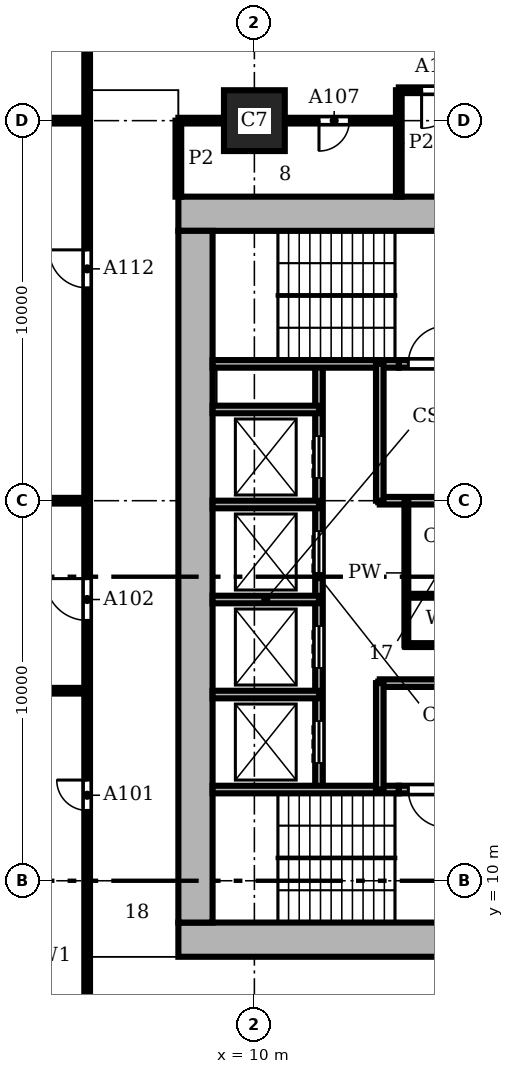
"""IFC4 building model, lengths in metres.
Left out: names, types, materials, properties, quantities, classifications, styles, units other than length and angle.
Written with IfcOpenShell. Run it as: python <this file> out.ifc"""

import sys

from ifc_helpers import new_model, si_unit, direction, frame, frame_2d, origin, origin_2d, place, context, subcontext, project, spatial, rectangle, extrude, element, fill, save


model = new_model("IFC4")
c1 = context("Model", 3, precision=1e-05, world=origin(), true_north=direction((0.0, 1.0)))
c2 = subcontext(c1, "Body", "Model", "MODEL_VIEW")
j1 = project(units=[si_unit("LENGTHUNIT", "METRE"), si_unit("PLANEANGLEUNIT", "RADIAN")], contexts=[c1])
p1 = place(None, origin())
s1 = spatial("IfcSite", under=j1, at=p1, CompositionType="ELEMENT")
p2 = place(p1, origin())
s2 = spatial("IfcBuilding", under=s1, at=p2, CompositionType="ELEMENT")
p3 = place(p2, frame((0.0, 0.0, 12.0)))
s3 = spatial("IfcBuildingStorey", under=s2, at=p3, CompositionType="ELEMENT", Elevation=12.0)
p4 = place(p3, frame((10.0, 30.0, 0.0), z_axis=(0.0, 0.0, 1.0), x_axis=(1.0, 0.0, 0.0)))
e1 = element("IfcColumn", 1, at=p4, inside=s3, PredefinedType="COLUMN", context=c2, shape_type="SweptSolid", body=[
    extrude(rectangle(XDim=1.6, YDim=1.6, at=origin_2d()), origin(), (0.0, 0.0, 1.0), 3.9),
])
for number, where, z_axis, x_axis in (
    (2, (8.0, 8.45, 0.0), (0.0, 0.0, 1.0), (1.0, 0.0, 0.0)),
    (3, (28.0, 27.55, 0.0), (0.0, 0.0, 1.0), (-1.0, 0.0, 0.0)),
):
    element("IfcWall", number, at=place(p3, frame(where, z_axis=z_axis, x_axis=x_axis)), inside=s3, PredefinedType="SHEAR", context=c2, shape_type="SweptSolid", body=[
        extrude(rectangle(XDim=20.0, YDim=0.9, at=frame_2d((10.0, 0.0))), origin(), (0.0, 0.0, 1.0), 3.9),
    ])
p5 = place(p3, frame((8.45, 27.1, 0.0), z_axis=(0.0, 0.0, 1.0), x_axis=(0.0, -1.0, 0.0)))
e4 = element("IfcWall", 4, at=p5, inside=s3, PredefinedType="SHEAR", context=c2, shape_type="SweptSolid", body=[
    extrude(rectangle(XDim=18.2, YDim=0.9, at=frame_2d((9.1, 0.0))), origin(), (0.0, 0.0, 1.0), 3.9),
])
p6 = place(p3, frame((2.532, 8.878, 0.0), z_axis=(0.0, 0.0, 1.0), x_axis=(0.608759824817, -0.793354571229, 0.0)))
e5 = element("IfcWall", 5, at=p6, inside=s3, PredefinedType="SOLIDWALL", context=c2, shape_type="SweptSolid", body=[
    extrude(rectangle(XDim=4.121, YDim=0.4, at=frame_2d((2.061, 0.0))), origin(), (0.0, 0.0, 1.0), 3.9),
])
p7 = place(p6, frame((1.611, 0.0, 0.9)))
e6 = element("IfcOpeningElement", 6, at=p7, cuts=e5, PredefinedType="OPENING", context=c2, shape_type="SweptSolid", body=[
    extrude(rectangle(XDim=0.9, YDim=2.35, at=frame_2d((0.45, 1.175))), frame((0.0, 0.21, 0.0), z_axis=(0.0, -1.0, 0.0), x_axis=(1.0, 0.0, 0.0)), (0.0, 0.0, 1.0), 0.42),
])
p8 = place(p3, frame((8.9, 12.4, 0.0), z_axis=(0.0, 0.0, 1.0), x_axis=(1.0, 0.0, 0.0)))
e7 = element("IfcWall", 7, at=p8, inside=s3, PredefinedType="SHEAR", context=c2, shape_type="SweptSolid", body=[
    extrude(rectangle(XDim=4.9, YDim=0.2, at=frame_2d((2.45, 0.0))), origin(), (0.0, 0.0, 1.0), 3.58),
])
p9 = place(p3, frame((13.8, 12.4, 0.0), z_axis=(0.0, 0.0, 1.0), x_axis=(1.0, 0.0, 0.0)))
e8 = element("IfcWall", 8, at=p9, inside=s3, PredefinedType="SHEAR", context=c2, shape_type="SweptSolid", body=[
    extrude(rectangle(XDim=13.3, YDim=0.2, at=frame_2d((6.65, 0.0))), origin(), (0.0, 0.0, 1.0), 3.58),
])
p10 = place(p9, frame((2.4, 0.0, 0.0)))
e9 = element("IfcOpeningElement", 9, at=p10, cuts=e8, PredefinedType="OPENING", context=c2, shape_type="SweptSolid", body=[
    extrude(rectangle(XDim=1.1, YDim=2.1, at=frame_2d((0.55, 1.05))), frame((0.0, 0.11, 0.0), z_axis=(0.0, -1.0, 0.0), x_axis=(1.0, 0.0, 0.0)), (0.0, 0.0, 1.0), 0.22),
])
p11 = place(p9, frame((4.9, 0.0, 0.0)))
e10 = element("IfcOpeningElement", 10, at=p11, cuts=e8, PredefinedType="OPENING", context=c2, shape_type="SweptSolid", body=[
    extrude(rectangle(XDim=1.1, YDim=2.1, at=frame_2d((0.55, 1.05))), frame((0.0, 0.11, 0.0), z_axis=(0.0, -1.0, 0.0), x_axis=(1.0, 0.0, 0.0)), (0.0, 0.0, 1.0), 0.22),
])
p12 = place(p9, frame((0.25, 0.0, 0.0)))
e11 = element("IfcOpeningElement", 11, at=p12, cuts=e8, PredefinedType="OPENING", context=c2, shape_type="SweptSolid", body=[
    extrude(rectangle(XDim=1.0, YDim=2.1, at=frame_2d((0.5, 1.05))), frame((0.0, 0.11, 0.0), z_axis=(0.0, -1.0, 0.0), x_axis=(1.0, 0.0, 0.0)), (0.0, 0.0, 1.0), 0.22),
])
p13 = place(p3, frame((8.9, 14.9, 0.0), z_axis=(0.0, 0.0, 1.0), x_axis=(1.0, 0.0, 0.0)))
e12 = element("IfcWall", 12, at=p13, inside=s3, PredefinedType="SHEAR", context=c2, shape_type="SweptSolid", body=[
    extrude(rectangle(XDim=2.8, YDim=0.2, at=frame_2d((1.4, 0.0))), origin(), (0.0, 0.0, 1.0), 3.58),
])
p14 = place(p3, frame((13.3, 15.2, 0.0), z_axis=(0.0, 0.0, 1.0), x_axis=(1.0, 0.0, 0.0)))
e13 = element("IfcWall", 13, at=p14, inside=s3, PredefinedType="SHEAR", context=c2, shape_type="SweptSolid", body=[
    extrude(rectangle(XDim=9.7, YDim=0.2, at=frame_2d((4.85, 0.0))), origin(), (0.0, 0.0, 1.0), 3.58),
])
p15 = place(p3, frame((14.0, 16.2, 0.0), z_axis=(0.0, 0.0, 1.0), x_axis=(1.0, 0.0, 0.0)))
e14 = element("IfcWall", 14, at=p15, inside=s3, PredefinedType="PARTITIONING", context=c2, shape_type="SweptSolid", body=[
    extrude(rectangle(XDim=8.0, YDim=0.1, at=frame_2d((4.0, 0.0))), origin(), (0.0, 0.0, 1.0), 3.58),
])
p16 = place(p3, frame((8.9, 17.4, 0.0), z_axis=(0.0, 0.0, 1.0), x_axis=(1.0, 0.0, 0.0)))
e15 = element("IfcWall", 15, at=p16, inside=s3, PredefinedType="SHEAR", context=c2, shape_type="SweptSolid", body=[
    extrude(rectangle(XDim=2.8, YDim=0.2, at=frame_2d((1.4, 0.0))), origin(), (0.0, 0.0, 1.0), 3.58),
])
p17 = place(p3, frame((14.0, 17.5, 0.0), z_axis=(0.0, 0.0, 1.0), x_axis=(1.0, 0.0, 0.0)))
e16 = element("IfcWall", 16, at=p17, inside=s3, PredefinedType="PARTITIONING", context=c2, shape_type="SweptSolid", body=[
    extrude(rectangle(XDim=8.0, YDim=0.1, at=frame_2d((4.0, 0.0))), origin(), (0.0, 0.0, 1.0), 3.58),
])
p18 = place(p17, frame((0.85, 0.0, 0.0)))
e17 = element("IfcOpeningElement", 17, at=p18, cuts=e16, PredefinedType="OPENING", context=c2, shape_type="SweptSolid", body=[
    extrude(rectangle(XDim=0.9, YDim=2.1, at=frame_2d((0.45, 1.05))), frame((0.0, 0.06, 0.0), z_axis=(0.0, -1.0, 0.0), x_axis=(1.0, 0.0, 0.0)), (0.0, 0.0, 1.0), 0.12),
])
p19 = place(p17, frame((3.55, 0.0, 0.0)))
e18 = element("IfcOpeningElement", 18, at=p19, cuts=e16, PredefinedType="OPENING", context=c2, shape_type="SweptSolid", body=[
    extrude(rectangle(XDim=0.9, YDim=2.1, at=frame_2d((0.45, 1.05))), frame((0.0, 0.06, 0.0), z_axis=(0.0, -1.0, 0.0), x_axis=(1.0, 0.0, 0.0)), (0.0, 0.0, 1.0), 0.12),
])
p20 = place(p17, frame((5.8, 0.0, 0.0)))
e19 = element("IfcOpeningElement", 19, at=p20, cuts=e16, PredefinedType="OPENING", context=c2, shape_type="SweptSolid", body=[
    extrude(rectangle(XDim=0.9, YDim=2.1, at=frame_2d((0.45, 1.05))), frame((0.0, 0.06, 0.0), z_axis=(0.0, -1.0, 0.0), x_axis=(1.0, 0.0, 0.0)), (0.0, 0.0, 1.0), 0.12),
])
p21 = place(p17, frame((7.2, 0.0, 0.0)))
e20 = element("IfcOpeningElement", 20, at=p21, cuts=e16, PredefinedType="OPENING", context=c2, shape_type="SweptSolid", body=[
    extrude(rectangle(XDim=0.7, YDim=2.1, at=frame_2d((0.35, 1.05))), frame((0.0, 0.06, 0.0), z_axis=(0.0, -1.0, 0.0), x_axis=(1.0, 0.0, 0.0)), (0.0, 0.0, 1.0), 0.12),
])
p22 = place(p3, frame((8.9, 19.9, 0.0), z_axis=(0.0, 0.0, 1.0), x_axis=(1.0, 0.0, 0.0)))
e21 = element("IfcWall", 21, at=p22, inside=s3, PredefinedType="SHEAR", context=c2, shape_type="SweptSolid", body=[
    extrude(rectangle(XDim=2.8, YDim=0.2, at=frame_2d((1.4, 0.0))), origin(), (0.0, 0.0, 1.0), 3.58),
])
p23 = place(p3, frame((13.3, 20.0, 0.0), z_axis=(0.0, 0.0, 1.0), x_axis=(1.0, 0.0, 0.0)))
e22 = element("IfcWall", 22, at=p23, inside=s3, PredefinedType="SHEAR", context=c2, shape_type="SweptSolid", body=[
    extrude(rectangle(XDim=4.7, YDim=0.2, at=frame_2d((2.35, 0.0))), origin(), (0.0, 0.0, 1.0), 3.58),
])
p24 = place(p3, frame((8.9, 22.4, 0.0), z_axis=(0.0, 0.0, 1.0), x_axis=(1.0, 0.0, 0.0)))
e23 = element("IfcWall", 23, at=p24, inside=s3, PredefinedType="SHEAR", context=c2, shape_type="SweptSolid", body=[
    extrude(rectangle(XDim=2.8, YDim=0.2, at=frame_2d((1.4, 0.0))), origin(), (0.0, 0.0, 1.0), 3.58),
])
p25 = place(p3, frame((8.9, 23.6, 0.0), z_axis=(0.0, 0.0, 1.0), x_axis=(1.0, 0.0, 0.0)))
e24 = element("IfcWall", 24, at=p25, inside=s3, PredefinedType="SHEAR", context=c2, shape_type="SweptSolid", body=[
    extrude(rectangle(XDim=4.9, YDim=0.2, at=frame_2d((2.45, 0.0))), origin(), (0.0, 0.0, 1.0), 3.58),
])
p26 = place(p3, frame((13.8, 23.6, 0.0), z_axis=(0.0, 0.0, 1.0), x_axis=(1.0, 0.0, 0.0)))
e25 = element("IfcWall", 25, at=p26, inside=s3, PredefinedType="SHEAR", context=c2, shape_type="SweptSolid", body=[
    extrude(rectangle(XDim=13.3, YDim=0.2, at=frame_2d((6.65, 0.0))), origin(), (0.0, 0.0, 1.0), 3.58),
])
p27 = place(p26, frame((2.4, 0.0, 0.0)))
e26 = element("IfcOpeningElement", 26, at=p27, cuts=e25, PredefinedType="OPENING", context=c2, shape_type="SweptSolid", body=[
    extrude(rectangle(XDim=1.1, YDim=2.1, at=frame_2d((0.55, 1.05))), frame((0.0, 0.11, 0.0), z_axis=(0.0, -1.0, 0.0), x_axis=(1.0, 0.0, 0.0)), (0.0, 0.0, 1.0), 0.22),
])
p28 = place(p26, frame((4.9, 0.0, 0.0)))
e27 = element("IfcOpeningElement", 27, at=p28, cuts=e25, PredefinedType="OPENING", context=c2, shape_type="SweptSolid", body=[
    extrude(rectangle(XDim=1.1, YDim=2.1, at=frame_2d((0.55, 1.05))), frame((0.0, 0.11, 0.0), z_axis=(0.0, -1.0, 0.0), x_axis=(1.0, 0.0, 0.0)), (0.0, 0.0, 1.0), 0.22),
])
p29 = place(p26, frame((0.25, 0.0, 0.0)))
e28 = element("IfcOpeningElement", 28, at=p29, cuts=e25, PredefinedType="OPENING", context=c2, shape_type="SweptSolid", body=[
    extrude(rectangle(XDim=1.0, YDim=2.1, at=frame_2d((0.5, 1.05))), frame((0.0, 0.11, 0.0), z_axis=(0.0, -1.0, 0.0), x_axis=(1.0, 0.0, 0.0)), (0.0, 0.0, 1.0), 0.22),
])
p30 = place(p3, frame((11.7, 12.4, 0.0), z_axis=(0.0, 0.0, 1.0), x_axis=(0.0, 1.0, 0.0)))
e29 = element("IfcWall", 29, at=p30, inside=s3, PredefinedType="SHEAR", context=c2, shape_type="SweptSolid", body=[
    extrude(rectangle(XDim=11.2, YDim=0.2, at=frame_2d((5.6, 0.0))), origin(), (0.0, 0.0, 1.0), 3.58),
])
p31 = place(p30, frame((0.7, 0.0, 0.0)))
e30 = element("IfcOpeningElement", 30, at=p31, cuts=e29, PredefinedType="OPENING", context=c2, shape_type="SweptSolid", body=[
    extrude(rectangle(XDim=1.1, YDim=2.1, at=frame_2d((0.55, 1.05))), frame((0.0, 0.11, 0.0), z_axis=(0.0, -1.0, 0.0), x_axis=(1.0, 0.0, 0.0)), (0.0, 0.0, 1.0), 0.22),
])
p32 = place(p30, frame((3.2, 0.0, 0.0)))
e31 = element("IfcOpeningElement", 31, at=p32, cuts=e29, PredefinedType="OPENING", context=c2, shape_type="SweptSolid", body=[
    extrude(rectangle(XDim=1.1, YDim=2.1, at=frame_2d((0.55, 1.05))), frame((0.0, 0.11, 0.0), z_axis=(0.0, -1.0, 0.0), x_axis=(1.0, 0.0, 0.0)), (0.0, 0.0, 1.0), 0.22),
])
p33 = place(p30, frame((5.7, 0.0, 0.0)))
e32 = element("IfcOpeningElement", 32, at=p33, cuts=e29, PredefinedType="OPENING", context=c2, shape_type="SweptSolid", body=[
    extrude(rectangle(XDim=1.1, YDim=2.1, at=frame_2d((0.55, 1.05))), frame((0.0, 0.11, 0.0), z_axis=(0.0, -1.0, 0.0), x_axis=(1.0, 0.0, 0.0)), (0.0, 0.0, 1.0), 0.22),
])
p34 = place(p30, frame((8.2, 0.0, 0.0)))
e33 = element("IfcOpeningElement", 33, at=p34, cuts=e29, PredefinedType="OPENING", context=c2, shape_type="SweptSolid", body=[
    extrude(rectangle(XDim=1.1, YDim=2.1, at=frame_2d((0.55, 1.05))), frame((0.0, 0.11, 0.0), z_axis=(0.0, -1.0, 0.0), x_axis=(1.0, 0.0, 0.0)), (0.0, 0.0, 1.0), 0.22),
])
p35 = place(p3, frame((13.3, 12.4, 0.0), z_axis=(0.0, 0.0, 1.0), x_axis=(0.0, 1.0, 0.0)))
e34 = element("IfcWall", 34, at=p35, inside=s3, PredefinedType="SHEAR", context=c2, shape_type="SweptSolid", body=[
    extrude(rectangle(XDim=2.8, YDim=0.2, at=frame_2d((1.4, 0.0))), origin(), (0.0, 0.0, 1.0), 3.58),
])
p36 = place(p3, frame((13.3, 20.0, 0.0), z_axis=(0.0, 0.0, 1.0), x_axis=(0.0, 1.0, 0.0)))
e35 = element("IfcWall", 35, at=p36, inside=s3, PredefinedType="SHEAR", context=c2, shape_type="SweptSolid", body=[
    extrude(rectangle(XDim=3.6, YDim=0.2, at=frame_2d((1.8, 0.0))), origin(), (0.0, 0.0, 1.0), 3.58),
])
p37 = place(p3, frame((14.0, 16.2, 0.0), z_axis=(0.0, 0.0, 1.0), x_axis=(0.0, 1.0, 0.0)))
e36 = element("IfcWall", 36, at=p37, inside=s3, PredefinedType="PARTITIONING", context=c2, shape_type="SweptSolid", body=[
    extrude(rectangle(XDim=3.8, YDim=0.1, at=frame_2d((1.9, 0.0))), origin(), (0.0, 0.0, 1.0), 3.58),
])
p38 = place(p3, frame((5.6, 5.6, 0.0), z_axis=(0.0, 0.0, 1.0), x_axis=(0.0, 1.0, 0.0)))
e37 = element("IfcWall", 37, at=p38, inside=s3, PredefinedType="PARTITIONING", context=c2, shape_type="SweptSolid", body=[
    extrude(rectangle(XDim=54.4, YDim=0.15, at=frame_2d((27.2, 0.0))), origin(), (0.0, 0.0, 1.0), 3.58),
])
p39 = place(p38, frame((6.25, 0.0, 0.0)))
e38 = element("IfcOpeningElement", 38, at=p39, cuts=e37, PredefinedType="OPENING", context=c2, shape_type="SweptSolid", body=[
    extrude(rectangle(XDim=0.8, YDim=2.1, at=frame_2d((0.4, 1.05))), frame((0.0, 0.085, 0.0), z_axis=(0.0, -1.0, 0.0), x_axis=(1.0, 0.0, 0.0)), (0.0, 0.0, 1.0), 0.17),
])
p40 = place(p38, frame((11.25, 0.0, 0.0)))
e39 = element("IfcOpeningElement", 39, at=p40, cuts=e37, PredefinedType="OPENING", context=c2, shape_type="SweptSolid", body=[
    extrude(rectangle(XDim=1.1, YDim=2.1, at=frame_2d((0.55, 1.05))), frame((0.0, 0.085, 0.0), z_axis=(0.0, -1.0, 0.0), x_axis=(1.0, 0.0, 0.0)), (0.0, 0.0, 1.0), 0.17),
])
p41 = place(p38, frame((20.0, 0.0, 0.0)))
e40 = element("IfcOpeningElement", 40, at=p41, cuts=e37, PredefinedType="OPENING", context=c2, shape_type="SweptSolid", body=[
    extrude(rectangle(XDim=1.0, YDim=2.1, at=frame_2d((0.5, 1.05))), frame((0.0, 0.085, 0.0), z_axis=(0.0, -1.0, 0.0), x_axis=(1.0, 0.0, 0.0)), (0.0, 0.0, 1.0), 0.17),
])
p42 = place(p38, frame((30.05, 0.0, 0.0)))
e41 = element("IfcOpeningElement", 41, at=p42, cuts=e37, PredefinedType="OPENING", context=c2, shape_type="SweptSolid", body=[
    extrude(rectangle(XDim=1.0, YDim=2.1, at=frame_2d((0.5, 1.05))), frame((0.0, 0.085, 0.0), z_axis=(0.0, -1.0, 0.0), x_axis=(1.0, 0.0, 0.0)), (0.0, 0.0, 1.0), 0.17),
])
p43 = place(p38, frame((38.5, 0.0, 0.0)))
e42 = element("IfcOpeningElement", 42, at=p43, cuts=e37, PredefinedType="OPENING", context=c2, shape_type="SweptSolid", body=[
    extrude(rectangle(XDim=1.0, YDim=2.1, at=frame_2d((0.5, 1.05))), frame((0.0, 0.085, 0.0), z_axis=(0.0, -1.0, 0.0), x_axis=(1.0, 0.0, 0.0)), (0.0, 0.0, 1.0), 0.17),
])
p44 = place(p38, frame((47.5, 0.0, 0.0)))
e43 = element("IfcOpeningElement", 43, at=p44, cuts=e37, PredefinedType="OPENING", context=c2, shape_type="SweptSolid", body=[
    extrude(rectangle(XDim=1.0, YDim=2.1, at=frame_2d((0.5, 1.05))), frame((0.0, 0.085, 0.0), z_axis=(0.0, -1.0, 0.0), x_axis=(1.0, 0.0, 0.0)), (0.0, 0.0, 1.0), 0.17),
])
p45 = place(p3, frame((8.0, 28.0, 0.0), z_axis=(0.0, 0.0, 1.0), x_axis=(0.0, 1.0, 0.0)))
e44 = element("IfcWall", 44, at=p45, inside=s3, PredefinedType="PARTITIONING", context=c2, shape_type="SweptSolid", body=[
    extrude(rectangle(XDim=2.0, YDim=0.15, at=frame_2d((1.0, 0.0))), origin(), (0.0, 0.0, 1.0), 3.58),
])
p46 = place(p3, frame((13.8, 28.0, 0.0), z_axis=(0.0, 0.0, 1.0), x_axis=(0.0, 1.0, 0.0)))
e45 = element("IfcWall", 45, at=p46, inside=s3, PredefinedType="PARTITIONING", context=c2, shape_type="SweptSolid", body=[
    extrude(rectangle(XDim=2.8, YDim=0.15, at=frame_2d((1.4, 0.0))), origin(), (0.0, 0.0, 1.0), 3.58),
])
p47 = place(p3, frame((0.063, 15.0, 0.0), z_axis=(0.0, 0.0, 1.0), x_axis=(1.0, 0.0, 0.0)))
e46 = element("IfcWall", 46, at=p47, inside=s3, PredefinedType="PARTITIONING", context=c2, shape_type="SweptSolid", body=[
    extrude(rectangle(XDim=5.537, YDim=0.15, at=frame_2d((2.769, 0.0))), origin(), (0.0, 0.0, 1.0), 3.58),
])
p48 = place(p3, frame((0.6, 20.0, 0.0), z_axis=(0.0, 0.0, 1.0), x_axis=(1.0, 0.0, 0.0)))
e47 = element("IfcWall", 47, at=p48, inside=s3, PredefinedType="PARTITIONING", context=c2, shape_type="SweptSolid", body=[
    extrude(rectangle(XDim=5.0, YDim=0.15, at=frame_2d((2.5, 0.0))), origin(), (0.0, 0.0, 1.0), 3.58),
])
p49 = place(p3, frame((0.5, 30.0, 0.0), z_axis=(0.0, 0.0, 1.0), x_axis=(1.0, 0.0, 0.0)))
e48 = element("IfcWall", 48, at=p49, inside=s3, PredefinedType="PARTITIONING", context=c2, shape_type="SweptSolid", body=[
    extrude(rectangle(XDim=5.1, YDim=0.15, at=frame_2d((2.55, 0.0))), origin(), (0.0, 0.0, 1.0), 3.58),
])
p50 = place(p3, frame((8.0, 30.0, 0.0), z_axis=(0.0, 0.0, 1.0), x_axis=(1.0, 0.0, 0.0)))
e49 = element("IfcWall", 49, at=p50, inside=s3, PredefinedType="PARTITIONING", context=c2, shape_type="SweptSolid", body=[
    extrude(rectangle(XDim=1.2, YDim=0.15, at=frame_2d((0.6, 0.0))), origin(), (0.0, 0.0, 1.0), 3.58),
])
p51 = place(p3, frame((10.8, 30.0, 0.0), z_axis=(0.0, 0.0, 1.0), x_axis=(1.0, 0.0, 0.0)))
e50 = element("IfcWall", 50, at=p51, inside=s3, PredefinedType="PARTITIONING", context=c2, shape_type="SweptSolid", body=[
    extrude(rectangle(XDim=3.0, YDim=0.15, at=frame_2d((1.5, 0.0))), origin(), (0.0, 0.0, 1.0), 3.58),
])
p52 = place(p51, frame((0.9, 0.0, 0.0)))
e51 = element("IfcOpeningElement", 51, at=p52, cuts=e50, PredefinedType="OPENING", context=c2, shape_type="SweptSolid", body=[
    extrude(rectangle(XDim=0.8, YDim=2.1, at=frame_2d((0.4, 1.05))), frame((0.0, 0.085, 0.0), z_axis=(0.0, -1.0, 0.0), x_axis=(1.0, 0.0, 0.0)), (0.0, 0.0, 1.0), 0.17),
])
p53 = place(p3, frame((13.8, 30.8, 0.0), z_axis=(0.0, 0.0, 1.0), x_axis=(1.0, 0.0, 0.0)))
e52 = element("IfcWall", 52, at=p53, inside=s3, PredefinedType="PARTITIONING", context=c2, shape_type="SweptSolid", body=[
    extrude(rectangle(XDim=5.4, YDim=0.15, at=frame_2d((2.7, 0.0))), origin(), (0.0, 0.0, 1.0), 3.58),
])
p54 = place(p53, frame((0.6, 0.0, 0.0)))
e53 = element("IfcOpeningElement", 53, at=p54, cuts=e52, PredefinedType="OPENING", context=c2, shape_type="SweptSolid", body=[
    extrude(rectangle(XDim=1.0, YDim=2.1, at=frame_2d((0.5, 1.05))), frame((0.0, 0.085, 0.0), z_axis=(0.0, -1.0, 0.0), x_axis=(1.0, 0.0, 0.0)), (0.0, 0.0, 1.0), 0.17),
])
p55 = place(p31, origin())
e54 = element("IfcDoor", 54, at=p55, inside=s3, OperationType="DOUBLE_DOOR_SLIDING", PredefinedType="DOOR", context=c2, shape_type="SweptSolid", body=[
    extrude(rectangle(XDim=1.1, YDim=2.1, at=frame_2d((0.55, 1.05))), frame((0.0, 0.025, 0.0), z_axis=(0.0, -1.0, 0.0), x_axis=(1.0, 0.0, 0.0)), (0.0, 0.0, 1.0), 0.05),
])
fill(e30, e54)
p56 = place(p32, origin())
e55 = element("IfcDoor", 55, at=p56, inside=s3, OperationType="DOUBLE_DOOR_SLIDING", PredefinedType="DOOR", context=c2, shape_type="SweptSolid", body=[
    extrude(rectangle(XDim=1.1, YDim=2.1, at=frame_2d((0.55, 1.05))), frame((0.0, 0.025, 0.0), z_axis=(0.0, -1.0, 0.0), x_axis=(1.0, 0.0, 0.0)), (0.0, 0.0, 1.0), 0.05),
])
fill(e31, e55)
p57 = place(p33, origin())
e56 = element("IfcDoor", 56, at=p57, inside=s3, OperationType="DOUBLE_DOOR_SLIDING", PredefinedType="DOOR", context=c2, shape_type="SweptSolid", body=[
    extrude(rectangle(XDim=1.1, YDim=2.1, at=frame_2d((0.55, 1.05))), frame((0.0, 0.025, 0.0), z_axis=(0.0, -1.0, 0.0), x_axis=(1.0, 0.0, 0.0)), (0.0, 0.0, 1.0), 0.05),
])
fill(e32, e56)
p58 = place(p34, origin())
e57 = element("IfcDoor", 57, at=p58, inside=s3, OperationType="DOUBLE_DOOR_SLIDING", PredefinedType="DOOR", context=c2, shape_type="SweptSolid", body=[
    extrude(rectangle(XDim=1.1, YDim=2.1, at=frame_2d((0.55, 1.05))), frame((0.0, 0.025, 0.0), z_axis=(0.0, -1.0, 0.0), x_axis=(1.0, 0.0, 0.0)), (0.0, 0.0, 1.0), 0.05),
])
fill(e33, e57)
p59 = place(p12, frame((1.0, 0.0, 0.0), z_axis=(0.0, 0.0, 1.0), x_axis=(-1.0, 0.0, 0.0)))
e58 = element("IfcDoor", 58, at=p59, inside=s3, OperationType="SINGLE_SWING_LEFT", PredefinedType="DOOR", context=c2, shape_type="SweptSolid", body=[
    extrude(rectangle(XDim=1.0, YDim=2.1, at=frame_2d((0.5, 1.05))), frame((0.0, 0.025, 0.0), z_axis=(0.0, -1.0, 0.0), x_axis=(1.0, 0.0, 0.0)), (0.0, 0.0, 1.0), 0.05),
])
fill(e11, e58)
p60 = place(p29, origin())
e59 = element("IfcDoor", 59, at=p60, inside=s3, OperationType="SINGLE_SWING_RIGHT", PredefinedType="DOOR", context=c2, shape_type="SweptSolid", body=[
    extrude(rectangle(XDim=1.0, YDim=2.1, at=frame_2d((0.5, 1.05))), frame((0.0, 0.025, 0.0), z_axis=(0.0, -1.0, 0.0), x_axis=(1.0, 0.0, 0.0)), (0.0, 0.0, 1.0), 0.05),
])
fill(e28, e59)
p61 = place(p39, origin())
e60 = element("IfcDoor", 60, at=p61, inside=s3, OperationType="SINGLE_SWING_RIGHT", PredefinedType="DOOR", context=c2, shape_type="SweptSolid", body=[
    extrude(rectangle(XDim=0.8, YDim=2.1, at=frame_2d((0.4, 1.05))), frame((0.0, 0.025, 0.0), z_axis=(0.0, -1.0, 0.0), x_axis=(1.0, 0.0, 0.0)), (0.0, 0.0, 1.0), 0.05),
])
fill(e38, e60)
p62 = place(p40, origin())
e61 = element("IfcDoor", 61, at=p62, inside=s3, OperationType="SINGLE_SWING_RIGHT", PredefinedType="DOOR", context=c2, shape_type="SweptSolid", body=[
    extrude(rectangle(XDim=1.1, YDim=2.1, at=frame_2d((0.55, 1.05))), frame((0.0, 0.025, 0.0), z_axis=(0.0, -1.0, 0.0), x_axis=(1.0, 0.0, 0.0)), (0.0, 0.0, 1.0), 0.05),
])
fill(e39, e61)
p63 = place(p52, frame((0.8, 0.0, 0.0), z_axis=(0.0, 0.0, 1.0), x_axis=(-1.0, 0.0, 0.0)))
e62 = element("IfcDoor", 62, at=p63, inside=s3, OperationType="SINGLE_SWING_RIGHT", PredefinedType="DOOR", context=c2, shape_type="SweptSolid", body=[
    extrude(rectangle(XDim=0.8, YDim=2.1, at=frame_2d((0.4, 1.05))), frame((0.0, 0.025, 0.0), z_axis=(0.0, -1.0, 0.0), x_axis=(1.0, 0.0, 0.0)), (0.0, 0.0, 1.0), 0.05),
])
fill(e51, e62)
p64 = place(p41, origin())
e63 = element("IfcDoor", 63, at=p64, inside=s3, OperationType="SINGLE_SWING_RIGHT", PredefinedType="DOOR", context=c2, shape_type="SweptSolid", body=[
    extrude(rectangle(XDim=1.0, YDim=2.1, at=frame_2d((0.5, 1.05))), frame((0.0, 0.025, 0.0), z_axis=(0.0, -1.0, 0.0), x_axis=(1.0, 0.0, 0.0)), (0.0, 0.0, 1.0), 0.05),
])
fill(e40, e63)
p65 = place(p54, frame((1.0, 0.0, 0.0), z_axis=(0.0, 0.0, 1.0), x_axis=(-1.0, 0.0, 0.0)))
e64 = element("IfcDoor", 64, at=p65, inside=s3, OperationType="SINGLE_SWING_RIGHT", PredefinedType="DOOR", context=c2, shape_type="SweptSolid", body=[
    extrude(rectangle(XDim=1.0, YDim=2.1, at=frame_2d((0.5, 1.05))), frame((0.0, 0.025, 0.0), z_axis=(0.0, -1.0, 0.0), x_axis=(1.0, 0.0, 0.0)), (0.0, 0.0, 1.0), 0.05),
])
fill(e53, e64)
save(model, sys.argv[1])
